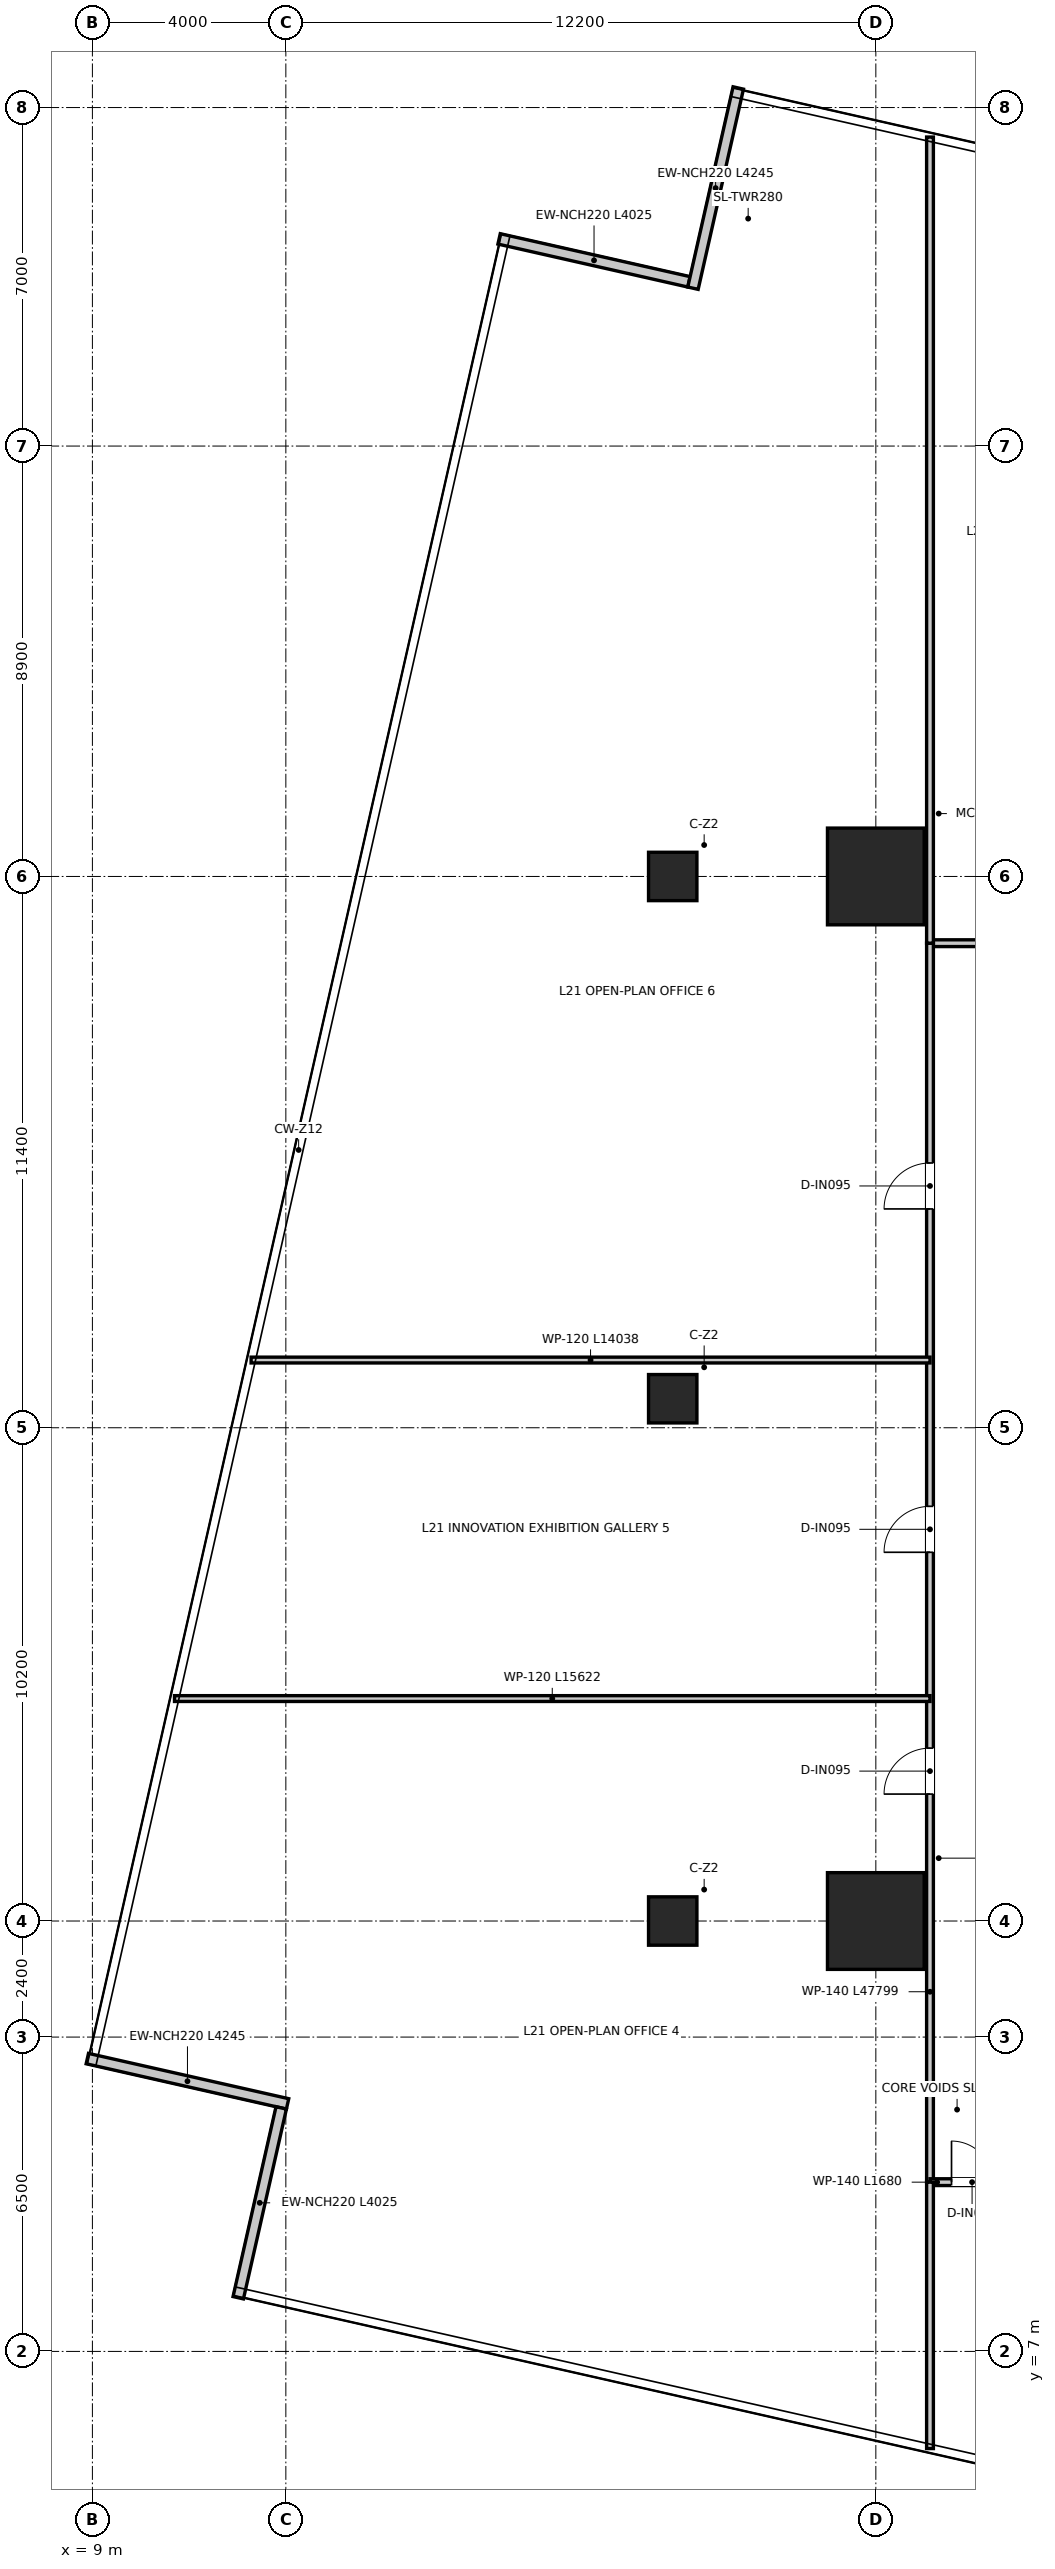
"""IFC4 building model, lengths in metres.
Left out: names, types, materials, properties, quantities, classifications, styles, units other than length and angle.
Written with IfcOpenShell. Run it as: python <this file> out.ifc"""

import sys

from ifc_helpers import new_model, si_unit, direction, frame, frame_2d, origin, origin_2d, place, context, subcontext, project, spatial, rectangle, extrude, source, transform, mapped, element, fill, save


model = new_model("IFC4")
c1 = context("Model", 3, precision=1e-05, world=origin(), true_north=direction((0.0, 1.0)))
c2 = subcontext(c1, "Body", "Model", "MODEL_VIEW")
j1 = project(units=[si_unit("LENGTHUNIT", "METRE"), si_unit("PLANEANGLEUNIT", "RADIAN")], contexts=[c1])
p1 = place(None, origin())
s1 = spatial("IfcSite", under=j1, at=p1, CompositionType="ELEMENT")
p2 = place(p1, origin())
s2 = spatial("IfcBuilding", under=s1, at=p2, CompositionType="ELEMENT")
p3 = place(p2, frame((0.0, 0.0, 90.05)))
s3 = spatial("IfcBuildingStorey", under=s2, at=p3, CompositionType="ELEMENT", Elevation=90.05)
m1 = source(origin(), c2, "Body", "SweptSolid", [
    extrude(rectangle(XDim=2.0, YDim=2.0, at=origin_2d()), origin(), (0.0, 0.0, 1.0), 3.95),
])
for number, where, z_axis, x_axis in (
    (1, (25.2, 15.9, 0.0), (0.0, 0.0, 1.0), (1.0, 0.0, 0.0)),
    (2, (25.2, 37.5, 0.0), (0.0, 0.0, 1.0), (1.0, 0.0, 0.0)),
):
    element("IfcColumn", number, at=place(p3, frame(where, z_axis=z_axis, x_axis=x_axis)), inside=s3, PredefinedType="USERDEFINED", context=c2, shape_type="MappedRepresentation", body=[
        mapped(m1, transform((0.0, 0.0, 0.0), x_axis=(1.0, 0.0, 0.0), y_axis=(0.0, 1.0, 0.0), z_axis=(0.0, 0.0, 1.0), scale=1.0)),
    ])
m2 = source(origin(), c2, "Body", "SweptSolid", [
    extrude(rectangle(XDim=1.0, YDim=1.0, at=origin_2d()), origin(), (0.0, 0.0, 1.0), 3.95),
])
for number, where, z_axis, x_axis in (
    (3, (21.0, 15.9, 0.0), (0.0, 0.0, 1.0), (1.0, 0.0, 0.0)),
    (4, (21.0, 26.7, 0.0), (0.0, 0.0, 1.0), (1.0, 0.0, 0.0)),
    (5, (21.0, 37.5, 0.0), (0.0, 0.0, 1.0), (1.0, 0.0, 0.0)),
):
    element("IfcColumn", number, at=place(p3, frame(where, z_axis=z_axis, x_axis=x_axis)), inside=s3, PredefinedType="COLUMN", context=c2, shape_type="MappedRepresentation", body=[
        mapped(m2, transform((0.0, 0.0, 0.0), x_axis=(1.0, 0.0, 0.0), y_axis=(0.0, 1.0, 0.0), z_axis=(0.0, 0.0, 1.0), scale=1.0)),
    ])
p4 = place(p3, frame((21.336, 49.796, 0.0), z_axis=(0.0, 0.0, 1.0), x_axis=(-0.975349272951, 0.2206667074, 0.0)))
e6 = element("IfcWall", 6, at=p4, inside=s3, PredefinedType="ELEMENTEDWALL", context=c2, shape_type="SweptSolid", body=[
    extrude(rectangle(XDim=4.025, YDim=0.22, at=frame_2d((2.012, 0.0))), origin(), (0.0, 0.0, 1.0), 3.67),
])
p5 = place(p3, frame((8.895, 13.055, 0.0), z_axis=(0.0, 0.0, 1.0), x_axis=(0.975347642517, -0.220673913812, 0.0)))
e7 = element("IfcWall", 7, at=p5, inside=s3, PredefinedType="ELEMENTEDWALL", context=c2, shape_type="SweptSolid", body=[
    extrude(rectangle(XDim=4.245, YDim=0.22, at=frame_2d((2.123, 0.0))), origin(), (0.0, 0.0, 1.0), 3.67),
])
p6 = place(p3, frame((12.904, 12.036, 0.0), z_axis=(0.0, 0.0, 1.0), x_axis=(-0.2206667074, -0.975349272951, 0.0)))
e8 = element("IfcWall", 8, at=p6, inside=s3, PredefinedType="ELEMENTEDWALL", context=c2, shape_type="SweptSolid", body=[
    extrude(rectangle(XDim=4.025, YDim=0.22, at=frame_2d((2.012, 0.0))), origin(), (0.0, 0.0, 1.0), 3.67),
])
p7 = place(p3, frame((22.355, 53.805, 0.0), z_axis=(0.0, 0.0, 1.0), x_axis=(-0.220673913812, -0.975347642517, 0.0)))
e9 = element("IfcWall", 9, at=p7, inside=s3, PredefinedType="ELEMENTEDWALL", context=c2, shape_type="SweptSolid", body=[
    extrude(rectangle(XDim=4.245, YDim=0.22, at=frame_2d((2.123, 0.0))), origin(), (0.0, 0.0, 1.0), 3.67),
])
p8 = place(p3, frame((26.32, 36.12, 0.0), z_axis=(0.0, 0.0, 1.0), x_axis=(1.0, 0.0, 0.0)))
e10 = element("IfcWall", 10, at=p8, inside=s3, PredefinedType="PARTITIONING", context=c2, shape_type="SweptSolid", body=[
    extrude(rectangle(XDim=19.36, YDim=0.14, at=frame_2d((9.68, 0.0))), origin(), (0.0, 0.0, 1.0), 3.08),
])
p9 = place(p8, frame((2.115, 0.0, 0.0)))
e11 = element("IfcOpeningElement", 11, at=p9, cuts=e10, PredefinedType="OPENING", context=c2, shape_type="SweptSolid", body=[
    extrude(rectangle(XDim=0.95, YDim=2.1, at=frame_2d((0.475, 1.05))), frame((0.0, 0.08, 0.0), z_axis=(0.0, -1.0, 0.0), x_axis=(1.0, 0.0, 0.0)), (0.0, 0.0, 1.0), 0.16),
])
p10 = place(p8, frame((8.705, 0.0, 0.0)))
e12 = element("IfcOpeningElement", 12, at=p10, cuts=e10, PredefinedType="OPENING", context=c2, shape_type="SweptSolid", body=[
    extrude(rectangle(XDim=0.95, YDim=2.1, at=frame_2d((0.475, 1.05))), frame((0.0, 0.08, 0.0), z_axis=(0.0, -1.0, 0.0), x_axis=(1.0, 0.0, 0.0)), (0.0, 0.0, 1.0), 0.16),
])
p11 = place(p8, frame((15.795, 0.0, 0.0)))
e13 = element("IfcOpeningElement", 13, at=p11, cuts=e10, PredefinedType="OPENING", context=c2, shape_type="SweptSolid", body=[
    extrude(rectangle(XDim=0.95, YDim=2.1, at=frame_2d((0.475, 1.05))), frame((0.0, 0.08, 0.0), z_axis=(0.0, -1.0, 0.0), x_axis=(1.0, 0.0, 0.0)), (0.0, 0.0, 1.0), 0.16),
])
p12 = place(p3, frame((26.32, 10.5, 0.0), z_axis=(0.0, 0.0, 1.0), x_axis=(0.0, 1.0, 0.0)))
e14 = element("IfcWall", 14, at=p12, inside=s3, PredefinedType="PARTITIONING", context=c2, shape_type="SweptSolid", body=[
    extrude(rectangle(XDim=25.62, YDim=0.14, at=frame_2d((12.81, 0.0))), origin(), (0.0, 0.0, 1.0), 2.97),
])
p13 = place(p12, frame((8.025, 0.0, 0.0)))
e15 = element("IfcOpeningElement", 15, at=p13, cuts=e14, PredefinedType="OPENING", context=c2, shape_type="SweptSolid", body=[
    extrude(rectangle(XDim=0.95, YDim=2.1, at=frame_2d((0.475, 1.05))), frame((0.0, 0.08, 0.0), z_axis=(0.0, -1.0, 0.0), x_axis=(1.0, 0.0, 0.0)), (0.0, 0.0, 1.0), 0.16),
])
p14 = place(p12, frame((13.025, 0.0, 0.0)))
e16 = element("IfcOpeningElement", 16, at=p14, cuts=e14, PredefinedType="OPENING", context=c2, shape_type="SweptSolid", body=[
    extrude(rectangle(XDim=0.95, YDim=2.1, at=frame_2d((0.475, 1.05))), frame((0.0, 0.08, 0.0), z_axis=(0.0, -1.0, 0.0), x_axis=(1.0, 0.0, 0.0)), (0.0, 0.0, 1.0), 0.16),
])
p15 = place(p12, frame((20.125, 0.0, 0.0)))
e17 = element("IfcOpeningElement", 17, at=p15, cuts=e14, PredefinedType="OPENING", context=c2, shape_type="SweptSolid", body=[
    extrude(rectangle(XDim=0.95, YDim=2.1, at=frame_2d((0.475, 1.05))), frame((0.0, 0.08, 0.0), z_axis=(0.0, -1.0, 0.0), x_axis=(1.0, 0.0, 0.0)), (0.0, 0.0, 1.0), 0.16),
])
p16 = place(p3, frame((26.32, 10.5, 0.0), z_axis=(0.0, 0.0, 1.0), x_axis=(1.0, 0.0, 0.0)))
e18 = element("IfcWall", 18, at=p16, inside=s3, PredefinedType="PARTITIONING", context=c2, shape_type="SweptSolid", body=[
    extrude(rectangle(XDim=1.68, YDim=0.14, at=frame_2d((0.84, 0.0))), origin(), (0.0, 0.0, 1.0), 3.67),
])
p17 = place(p16, frame((0.445, 0.0, 0.0)))
e19 = element("IfcOpeningElement", 19, at=p17, cuts=e18, PredefinedType="OPENING", context=c2, shape_type="SweptSolid", body=[
    extrude(rectangle(XDim=0.85, YDim=2.1, at=frame_2d((0.425, 1.05))), frame((0.0, 0.08, 0.0), z_axis=(0.0, -1.0, 0.0), x_axis=(1.0, 0.0, 0.0)), (0.0, 0.0, 1.0), 0.16),
])
p18 = place(p3, frame((26.32, 36.12, 0.0), z_axis=(0.0, 0.0, 1.0), x_axis=(0.0, 1.0, 0.0)))
e20 = element("IfcWall", 20, at=p18, inside=s3, PredefinedType="PARTITIONING", context=c2, shape_type="SweptSolid", body=[
    extrude(rectangle(XDim=16.67, YDim=0.14, at=frame_2d((8.335, 0.0))), origin(), (0.0, 0.0, 1.0), 2.97),
])
p19 = place(p3, frame((26.32, 4.991, 0.0), z_axis=(0.0, 0.0, 1.0), x_axis=(0.0, 1.0, 0.0)))
e21 = element("IfcWall", 21, at=p19, inside=s3, PredefinedType="PARTITIONING", context=c2, shape_type="SweptSolid", body=[
    extrude(rectangle(XDim=5.509, YDim=0.14, at=frame_2d((2.754, 0.0))), origin(), (0.0, 0.0, 1.0), 3.67),
])
p20 = place(p3, frame((10.698, 20.5, 0.0), z_axis=(0.0, 0.0, 1.0), x_axis=(1.0, 0.0, 0.0)))
e22 = element("IfcWall", 22, at=p20, inside=s3, PredefinedType="PARTITIONING", context=c2, shape_type="SweptSolid", body=[
    extrude(rectangle(XDim=15.622, YDim=0.12, at=frame_2d((7.811, 0.0))), origin(), (0.0, 0.0, 1.0), 2.97),
])
p21 = place(p3, frame((12.282, 27.5, 0.0), z_axis=(0.0, 0.0, 1.0), x_axis=(1.0, 0.0, 0.0)))
e23 = element("IfcWall", 23, at=p21, inside=s3, PredefinedType="PARTITIONING", context=c2, shape_type="SweptSolid", body=[
    extrude(rectangle(XDim=14.038, YDim=0.12, at=frame_2d((7.019, 0.0))), origin(), (0.0, 0.0, 1.0), 2.97),
])
p22 = place(p13, origin())
e24 = element("IfcDoor", 24, at=p22, inside=s3, OperationType="SINGLE_SWING_LEFT", PredefinedType="DOOR", context=c2, shape_type="SweptSolid", body=[
    extrude(rectangle(XDim=0.95, YDim=2.1, at=frame_2d((0.475, 1.05))), frame((0.0, 0.025, 0.0), z_axis=(0.0, -1.0, 0.0), x_axis=(1.0, 0.0, 0.0)), (0.0, 0.0, 1.0), 0.05),
])
fill(e15, e24)
p23 = place(p14, origin())
e25 = element("IfcDoor", 25, at=p23, inside=s3, OperationType="SINGLE_SWING_LEFT", PredefinedType="DOOR", context=c2, shape_type="SweptSolid", body=[
    extrude(rectangle(XDim=0.95, YDim=2.1, at=frame_2d((0.475, 1.05))), frame((0.0, 0.025, 0.0), z_axis=(0.0, -1.0, 0.0), x_axis=(1.0, 0.0, 0.0)), (0.0, 0.0, 1.0), 0.05),
])
fill(e16, e25)
p24 = place(p15, origin())
e26 = element("IfcDoor", 26, at=p24, inside=s3, OperationType="SINGLE_SWING_LEFT", PredefinedType="DOOR", context=c2, shape_type="SweptSolid", body=[
    extrude(rectangle(XDim=0.95, YDim=2.1, at=frame_2d((0.475, 1.05))), frame((0.0, 0.025, 0.0), z_axis=(0.0, -1.0, 0.0), x_axis=(1.0, 0.0, 0.0)), (0.0, 0.0, 1.0), 0.05),
])
fill(e17, e26)
p25 = place(p17, origin())
e27 = element("IfcDoor", 27, at=p25, inside=s3, OperationType="SINGLE_SWING_LEFT", PredefinedType="DOOR", context=c2, shape_type="SweptSolid", body=[
    extrude(rectangle(XDim=0.85, YDim=2.1, at=frame_2d((0.425, 1.05))), frame((0.0, 0.025, 0.0), z_axis=(0.0, -1.0, 0.0), x_axis=(1.0, 0.0, 0.0)), (0.0, 0.0, 1.0), 0.05),
])
fill(e19, e27)
save(model, sys.argv[1])
